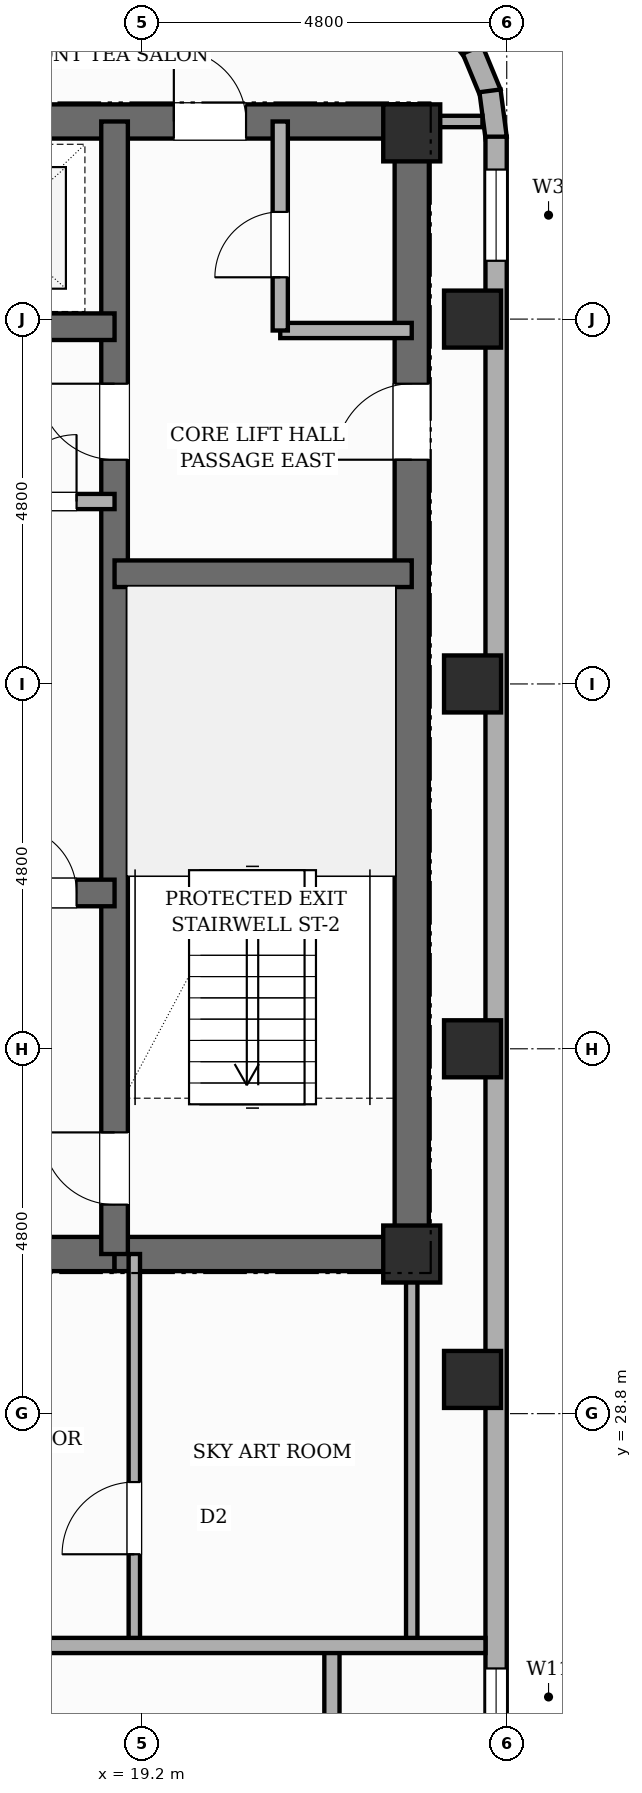
"""IFC4 building model, lengths in metres.
Left out: names, types, materials, properties, quantities, classifications, styles, units other than length and angle.
Written with IfcOpenShell. Run it as: python <this file> out.ifc"""

import sys

from ifc_helpers import new_model, si_unit, direction, frame, frame_2d, origin, origin_2d, place, context, subcontext, project, spatial, rectangle, extrude, element, fill, save


model = new_model("IFC4")
c1 = context("Model", 3, precision=1e-05, world=origin(), true_north=direction((0.0, 1.0)))
c2 = subcontext(c1, "Body", "Model", "MODEL_VIEW")
j1 = project(units=[si_unit("LENGTHUNIT", "METRE"), si_unit("PLANEANGLEUNIT", "RADIAN")], contexts=[c1])
p1 = place(None, origin())
s1 = spatial("IfcSite", under=j1, at=p1, CompositionType="ELEMENT")
p2 = place(p1, origin())
s2 = spatial("IfcBuilding", under=s1, at=p2, CompositionType="ELEMENT")
p3 = place(p2, frame((0.0, 0.0, 278.5)))
s3 = spatial("IfcBuildingStorey", under=s2, at=p3, CompositionType="ELEMENT", Elevation=278.5)
p4 = place(p3, frame((22.75, 30.675, 0.0), z_axis=(0.0, 0.0, 1.0), x_axis=(0.0, 1.0, 0.0)))
e1 = element("IfcWall", 1, at=p4, inside=s3, PredefinedType="SHEAR", context=c2, shape_type="SweptSolid", body=[
    extrude(rectangle(XDim=15.35, YDim=0.45, at=frame_2d((7.675, 0.0))), origin(), (0.0, 0.0, 1.0), 4.3),
])
p5 = place(p4, frame((10.675, 0.0, 0.0)))
e2 = element("IfcOpeningElement", 2, at=p5, cuts=e1, PredefinedType="OPENING", context=c2, shape_type="SweptSolid", body=[
    extrude(rectangle(XDim=1.0, YDim=2.15, at=frame_2d((0.5, 1.075))), frame((0.0, 0.235, 0.0), z_axis=(0.0, -1.0, 0.0), x_axis=(1.0, 0.0, 0.0)), (0.0, 0.0, 1.0), 0.47),
])
p6 = place(p3, frame((6.05, 45.8, 0.0), z_axis=(0.0, 0.0, 1.0), x_axis=(1.0, 0.0, 0.0)))
e3 = element("IfcWall", 3, at=p6, inside=s3, PredefinedType="SHEAR", context=c2, shape_type="SweptSolid", body=[
    extrude(rectangle(XDim=16.7, YDim=0.45, at=frame_2d((8.35, 0.0))), origin(), (0.0, 0.0, 1.0), 4.3),
])
p7 = place(p6, frame((13.57, 0.0, 0.0)))
e4 = element("IfcOpeningElement", 4, at=p7, cuts=e3, PredefinedType="OPENING", context=c2, shape_type="SweptSolid", body=[
    extrude(rectangle(XDim=0.95, YDim=2.15, at=frame_2d((0.475, 1.075))), frame((0.0, 0.235, 0.0), z_axis=(0.0, -1.0, 0.0), x_axis=(1.0, 0.0, 0.0)), (0.0, 0.0, 1.0), 0.47),
])
p8 = place(p3, frame((9.96, 30.9, 0.0), z_axis=(0.0, 0.0, 1.0), x_axis=(1.0, 0.0, 0.0)))
e5 = element("IfcWall", 5, at=p8, inside=s3, PredefinedType="SHEAR", context=c2, shape_type="SweptSolid", body=[
    extrude(rectangle(XDim=8.88, YDim=0.45, at=frame_2d((4.44, 0.0))), origin(), (0.0, 0.0, 1.0), 4.3),
])
p9 = place(p8, frame((4.09, 0.0, 0.0)))
e6 = element("IfcOpeningElement", 6, at=p9, cuts=e5, PredefinedType="OPENING", context=c2, shape_type="SweptSolid", body=[
    extrude(rectangle(XDim=1.0, YDim=2.15, at=frame_2d((0.5, 1.075))), frame((0.0, 0.235, 0.0), z_axis=(0.0, -1.0, 0.0), x_axis=(1.0, 0.0, 0.0)), (0.0, 0.0, 1.0), 0.47),
])
p10 = place(p3, frame((18.84, 30.9, 0.0), z_axis=(0.0, 0.0, 1.0), x_axis=(1.0, 0.0, 0.0)))
e7 = element("IfcWall", 7, at=p10, inside=s3, PredefinedType="SHEAR", context=c2, shape_type="SweptSolid", body=[
    extrude(rectangle(XDim=3.91, YDim=0.45, at=frame_2d((1.955, 0.0))), origin(), (0.0, 0.0, 1.0), 4.3),
])
p11 = place(p3, frame((18.84, 30.9, 0.0), z_axis=(0.0, 0.0, 1.0), x_axis=(0.0, 1.0, 0.0)))
e8 = element("IfcWall", 8, at=p11, inside=s3, PredefinedType="SHEAR", context=c2, shape_type="SweptSolid", body=[
    extrude(rectangle(XDim=14.9, YDim=0.35, at=frame_2d((7.45, 0.0))), origin(), (0.0, 0.0, 1.0), 4.3),
])
p12 = place(p11, frame((0.65, 0.0, 0.0)))
e9 = element("IfcOpeningElement", 9, at=p12, cuts=e8, PredefinedType="OPENING", context=c2, shape_type="SweptSolid", body=[
    extrude(rectangle(XDim=0.95, YDim=2.1, at=frame_2d((0.475, 1.05))), frame((0.0, 0.185, 0.0), z_axis=(0.0, -1.0, 0.0), x_axis=(1.0, 0.0, 0.0)), (0.0, 0.0, 1.0), 0.37),
])
p13 = place(p11, frame((10.45, 0.0, 0.0)))
e10 = element("IfcOpeningElement", 10, at=p13, cuts=e8, PredefinedType="OPENING", context=c2, shape_type="SweptSolid", body=[
    extrude(rectangle(XDim=1.0, YDim=2.15, at=frame_2d((0.5, 1.075))), frame((0.0, 0.185, 0.0), z_axis=(0.0, -1.0, 0.0), x_axis=(1.0, 0.0, 0.0)), (0.0, 0.0, 1.0), 0.37),
])
p14 = place(p3, frame((18.84, 39.85, 0.0), z_axis=(0.0, 0.0, 1.0), x_axis=(1.0, 0.0, 0.0)))
e11 = element("IfcWall", 11, at=p14, inside=s3, PredefinedType="SHEAR", context=c2, shape_type="SweptSolid", body=[
    extrude(rectangle(XDim=3.91, YDim=0.35, at=frame_2d((1.955, 0.0))), origin(), (0.0, 0.0, 1.0), 4.3),
])
p15 = place(p3, frame((9.96, 35.65, 0.0), z_axis=(0.0, 0.0, 1.0), x_axis=(1.0, 0.0, 0.0)))
e12 = element("IfcWall", 12, at=p15, inside=s3, PredefinedType="SHEAR", context=c2, shape_type="SweptSolid", body=[
    extrude(rectangle(XDim=8.88, YDim=0.35, at=frame_2d((4.44, 0.0))), origin(), (0.0, 0.0, 1.0), 4.3),
])
p16 = place(p15, frame((0.84, 0.0, 0.0)))
e13 = element("IfcOpeningElement", 13, at=p16, cuts=e12, PredefinedType="OPENING", context=c2, shape_type="SweptSolid", body=[
    extrude(rectangle(XDim=1.1, YDim=2.15, at=frame_2d((0.55, 1.075))), frame((0.0, 0.185, 0.0), z_axis=(0.0, -1.0, 0.0), x_axis=(1.0, 0.0, 0.0)), (0.0, 0.0, 1.0), 0.37),
])
p17 = place(p15, frame((5.24, 0.0, 0.0)))
e14 = element("IfcOpeningElement", 14, at=p17, cuts=e12, PredefinedType="OPENING", context=c2, shape_type="SweptSolid", body=[
    extrude(rectangle(XDim=1.1, YDim=2.15, at=frame_2d((0.55, 1.075))), frame((0.0, 0.185, 0.0), z_axis=(0.0, -1.0, 0.0), x_axis=(1.0, 0.0, 0.0)), (0.0, 0.0, 1.0), 0.37),
])
p18 = place(p15, frame((7.5, 0.0, 0.0)))
e15 = element("IfcOpeningElement", 15, at=p18, cuts=e12, PredefinedType="OPENING", context=c2, shape_type="SweptSolid", body=[
    extrude(rectangle(XDim=0.88, YDim=2.1, at=frame_2d((0.44, 1.05))), frame((0.0, 0.185, 0.0), z_axis=(0.0, -1.0, 0.0), x_axis=(1.0, 0.0, 0.0)), (0.0, 0.0, 1.0), 0.37),
])
p19 = place(p3, frame((9.96, 43.1, 0.0), z_axis=(0.0, 0.0, 1.0), x_axis=(1.0, 0.0, 0.0)))
e16 = element("IfcWall", 16, at=p19, inside=s3, PredefinedType="SHEAR", context=c2, shape_type="SweptSolid", body=[
    extrude(rectangle(XDim=8.88, YDim=0.35, at=frame_2d((4.44, 0.0))), origin(), (0.0, 0.0, 1.0), 4.3),
])
p20 = place(p19, frame((0.99, 0.0, 0.0)))
e17 = element("IfcOpeningElement", 17, at=p20, cuts=e16, PredefinedType="OPENING", context=c2, shape_type="SweptSolid", body=[
    extrude(rectangle(XDim=1.1, YDim=2.15, at=frame_2d((0.55, 1.075))), frame((0.0, 0.185, 0.0), z_axis=(0.0, -1.0, 0.0), x_axis=(1.0, 0.0, 0.0)), (0.0, 0.0, 1.0), 0.37),
])
p21 = place(p19, frame((3.89, 0.0, 0.0)))
e18 = element("IfcOpeningElement", 18, at=p21, cuts=e16, PredefinedType="OPENING", context=c2, shape_type="SweptSolid", body=[
    extrude(rectangle(XDim=1.1, YDim=2.15, at=frame_2d((0.55, 1.075))), frame((0.0, 0.185, 0.0), z_axis=(0.0, -1.0, 0.0), x_axis=(1.0, 0.0, 0.0)), (0.0, 0.0, 1.0), 0.37),
])
p22 = place(p19, frame((6.79, 0.0, 0.0)))
e19 = element("IfcOpeningElement", 19, at=p22, cuts=e16, PredefinedType="OPENING", context=c2, shape_type="SweptSolid", body=[
    extrude(rectangle(XDim=1.1, YDim=2.15, at=frame_2d((0.55, 1.075))), frame((0.0, 0.185, 0.0), z_axis=(0.0, -1.0, 0.0), x_axis=(1.0, 0.0, 0.0)), (0.0, 0.0, 1.0), 0.37),
])
for number, where, z_axis, x_axis in (
    (20, (22.75, 30.9, 0.0), (0.0, 0.0, 1.0), (1.0, 0.0, 0.0)),
    (21, (22.75, 45.65, 0.0), (0.0, 0.0, 1.0), (1.0, 0.0, 0.0)),
    (22, (23.55, 29.25, 0.0), (0.0, 0.0, 1.0), (1.0, 0.0, 0.0)),
    (23, (23.55, 33.6, 0.0), (0.0, 0.0, 1.0), (1.0, 0.0, 0.0)),
    (24, (23.55, 38.4, 0.0), (0.0, 0.0, 1.0), (1.0, 0.0, 0.0)),
    (25, (23.55, 43.2, 0.0), (0.0, 0.0, 1.0), (1.0, 0.0, 0.0)),
):
    element("IfcColumn", number, at=place(p3, frame(where, z_axis=z_axis, x_axis=x_axis)), inside=s3, PredefinedType="COLUMN", context=c2, shape_type="SweptSolid", body=[
        extrude(rectangle(XDim=0.75, YDim=0.75, at=origin_2d()), origin(), (0.0, 0.0, 1.0), 4.3),
    ])
for number, where, z_axis, x_axis in (
    (26, (23.186, 47.212, 0.0), (0.0, 0.0, 1.0), (0.609, -0.793, 0.0)),
    (27, (23.549, 46.746, 0.0), (0.0, 0.0, 1.0), (0.382, -0.924, 0.0)),
    (28, (23.779, 46.203, 0.0), (0.0, 0.0, 1.0), (0.131, -0.991, 0.0)),
):
    element("IfcWall", number, at=place(p3, frame(where, z_axis=z_axis, x_axis=x_axis)), inside=s3, PredefinedType="STANDARD", context=c2, shape_type="SweptSolid", body=[
        extrude(rectangle(XDim=0.626, YDim=0.28, at=frame_2d((0.313, 0.0))), origin(), (0.0, 0.0, 1.0), 3.32),
    ])
p23 = place(p3, frame((23.86, 45.6, 0.0), z_axis=(0.0, 0.0, 1.0), x_axis=(0.0, -1.0, 0.0)))
e29 = element("IfcWall", 29, at=p23, inside=s3, PredefinedType="STANDARD", context=c2, shape_type="SweptSolid", body=[
    extrude(rectangle(XDim=32.4, YDim=0.28, at=frame_2d((16.2, 0.0))), origin(), (0.0, 0.0, 1.0), 3.32),
])
p24 = place(p23, frame((28.25, 0.0, 0.0)))
e30 = element("IfcOpeningElement", 30, at=p24, cuts=e29, PredefinedType="OPENING", context=c2, shape_type="SweptSolid", body=[
    extrude(rectangle(XDim=1.1, YDim=2.15, at=frame_2d((0.55, 1.075))), frame((0.0, 0.15, 0.0), z_axis=(0.0, -1.0, 0.0), x_axis=(1.0, 0.0, 0.0)), (0.0, 0.0, 1.0), 0.3),
])
p25 = place(p23, frame((29.752, 0.0, 0.45)))
e31 = element("IfcOpeningElement", 31, at=p25, cuts=e29, PredefinedType="OPENING", context=c2, shape_type="SweptSolid", body=[
    extrude(rectangle(XDim=0.75, YDim=1.8, at=frame_2d((0.375, 0.9))), frame((0.0, 0.15, 0.0), z_axis=(0.0, -1.0, 0.0), x_axis=(1.0, 0.0, 0.0)), (0.0, 0.0, 1.0), 0.3),
])
p26 = place(p23, frame((20.153, 0.0, 0.45)))
e32 = element("IfcOpeningElement", 32, at=p26, cuts=e29, PredefinedType="OPENING", context=c2, shape_type="SweptSolid", body=[
    extrude(rectangle(XDim=0.75, YDim=1.8, at=frame_2d((0.375, 0.9))), frame((0.0, 0.15, 0.0), z_axis=(0.0, -1.0, 0.0), x_axis=(1.0, 0.0, 0.0)), (0.0, 0.0, 1.0), 0.3),
])
p27 = place(p23, frame((0.433, 0.0, 0.8)))
e33 = element("IfcOpeningElement", 33, at=p27, cuts=e29, PredefinedType="OPENING", context=c2, shape_type="SweptSolid", body=[
    extrude(rectangle(XDim=1.2, YDim=1.8, at=frame_2d((0.6, 0.9))), frame((0.0, 0.15, 0.0), z_axis=(0.0, -1.0, 0.0), x_axis=(1.0, 0.0, 0.0)), (0.0, 0.0, 1.0), 0.3),
])
p28 = place(p3, frame((9.96, 40.8, 0.0), z_axis=(0.0, 0.0, 1.0), x_axis=(1.0, 0.0, 0.0)))
e34 = element("IfcWall", 34, at=p28, inside=s3, PredefinedType="POLYGONAL", context=c2, shape_type="SweptSolid", body=[
    extrude(rectangle(XDim=8.88, YDim=0.2, at=frame_2d((4.44, 0.0))), origin(), (0.0, 0.0, 1.0), 4.04),
])
p29 = place(p28, frame((7.5, 0.0, 0.0)))
e35 = element("IfcOpeningElement", 35, at=p29, cuts=e34, PredefinedType="OPENING", context=c2, shape_type="SweptSolid", body=[
    extrude(rectangle(XDim=0.88, YDim=2.1, at=frame_2d((0.44, 1.05))), frame((0.0, 0.11, 0.0), z_axis=(0.0, -1.0, 0.0), x_axis=(1.0, 0.0, 0.0)), (0.0, 0.0, 1.0), 0.22),
])
p30 = place(p28, frame((2.2, 0.0, 0.0)))
e36 = element("IfcOpeningElement", 36, at=p30, cuts=e34, PredefinedType="OPENING", context=c2, shape_type="SweptSolid", body=[
    extrude(rectangle(XDim=0.88, YDim=2.1, at=frame_2d((0.44, 1.05))), frame((0.0, 0.11, 0.0), z_axis=(0.0, -1.0, 0.0), x_axis=(1.0, 0.0, 0.0)), (0.0, 0.0, 1.0), 0.22),
])
p31 = place(p28, frame((5.5, 0.0, 0.0)))
e37 = element("IfcOpeningElement", 37, at=p31, cuts=e34, PredefinedType="OPENING", context=c2, shape_type="SweptSolid", body=[
    extrude(rectangle(XDim=0.88, YDim=2.1, at=frame_2d((0.44, 1.05))), frame((0.0, 0.11, 0.0), z_axis=(0.0, -1.0, 0.0), x_axis=(1.0, 0.0, 0.0)), (0.0, 0.0, 1.0), 0.22),
])
p32 = place(p3, frame((21.02, 43.05, 0.0), z_axis=(0.0, 0.0, 1.0), x_axis=(1.0, 0.0, 0.0)))
e38 = element("IfcWall", 38, at=p32, inside=s3, PredefinedType="POLYGONAL", context=c2, shape_type="SweptSolid", body=[
    extrude(rectangle(XDim=1.73, YDim=0.2, at=frame_2d((0.865, 0.0))), origin(), (0.0, 0.0, 1.0), 3.32),
])
p33 = place(p3, frame((21.02, 43.05, 0.0), z_axis=(0.0, 0.0, 1.0), x_axis=(0.0, 1.0, 0.0)))
e39 = element("IfcWall", 39, at=p33, inside=s3, PredefinedType="POLYGONAL", context=c2, shape_type="SweptSolid", body=[
    extrude(rectangle(XDim=2.75, YDim=0.2, at=frame_2d((1.375, 0.0))), origin(), (0.0, 0.0, 1.0), 4.04),
])
p34 = place(p33, frame((0.7, 0.0, 0.0)))
e40 = element("IfcOpeningElement", 40, at=p34, cuts=e39, PredefinedType="OPENING", context=c2, shape_type="SweptSolid", body=[
    extrude(rectangle(XDim=0.86, YDim=2.1, at=frame_2d((0.43, 1.05))), frame((0.0, 0.11, 0.0), z_axis=(0.0, -1.0, 0.0), x_axis=(1.0, 0.0, 0.0)), (0.0, 0.0, 1.0), 0.22),
])
p35 = place(p3, frame((22.75, 25.75, 0.0), z_axis=(0.0, 0.0, 1.0), x_axis=(0.0, 1.0, 0.0)))
e41 = element("IfcWall", 41, at=p35, inside=s3, PredefinedType="PARTITIONING", context=c2, shape_type="SweptSolid", body=[
    extrude(rectangle(XDim=5.15, YDim=0.15, at=frame_2d((2.575, 0.0))), origin(), (0.0, 0.0, 1.0), 4.04),
])
p36 = place(p3, frame((19.1, 25.75, 0.0), z_axis=(0.0, 0.0, 1.0), x_axis=(0.0, 1.0, 0.0)))
e42 = element("IfcWall", 42, at=p36, inside=s3, PredefinedType="PARTITIONING", context=c2, shape_type="SweptSolid", body=[
    extrude(rectangle(XDim=5.15, YDim=0.15, at=frame_2d((2.575, 0.0))), origin(), (0.0, 0.0, 1.0), 4.04),
])
p37 = place(p36, frame((1.2, 0.0, 0.0)))
e43 = element("IfcOpeningElement", 43, at=p37, cuts=e42, PredefinedType="OPENING", context=c2, shape_type="SweptSolid", body=[
    extrude(rectangle(XDim=0.95, YDim=2.15, at=frame_2d((0.475, 1.075))), frame((0.0, 0.085, 0.0), z_axis=(0.0, -1.0, 0.0), x_axis=(1.0, 0.0, 0.0)), (0.0, 0.0, 1.0), 0.17),
])
p38 = place(p3, frame((21.7, 11.12, 0.0), z_axis=(0.0, 0.0, 1.0), x_axis=(0.0, 1.0, 0.0)))
e44 = element("IfcWall", 44, at=p38, inside=s3, PredefinedType="PARTITIONING", context=c2, shape_type="SweptSolid", body=[
    extrude(rectangle(XDim=14.63, YDim=0.2, at=frame_2d((7.315, 0.0))), origin(), (0.0, 0.0, 1.0), 4.04),
])
p39 = place(p38, frame((3.13, 0.0, 0.0)))
e45 = element("IfcOpeningElement", 45, at=p39, cuts=e44, PredefinedType="OPENING", context=c2, shape_type="SweptSolid", body=[
    extrude(rectangle(XDim=0.95, YDim=2.15, at=frame_2d((0.475, 1.075))), frame((0.0, 0.11, 0.0), z_axis=(0.0, -1.0, 0.0), x_axis=(1.0, 0.0, 0.0)), (0.0, 0.0, 1.0), 0.22),
])
p40 = place(p38, frame((10.45, 0.0, 0.0)))
e46 = element("IfcOpeningElement", 46, at=p40, cuts=e44, PredefinedType="OPENING", context=c2, shape_type="SweptSolid", body=[
    extrude(rectangle(XDim=0.95, YDim=2.15, at=frame_2d((0.475, 1.075))), frame((0.0, 0.11, 0.0), z_axis=(0.0, -1.0, 0.0), x_axis=(1.0, 0.0, 0.0)), (0.0, 0.0, 1.0), 0.22),
])
p41 = place(p3, frame((15.5, 25.75, 0.0), z_axis=(0.0, 0.0, 1.0), x_axis=(1.0, 0.0, 0.0)))
e47 = element("IfcWall", 47, at=p41, inside=s3, PredefinedType="PARTITIONING", context=c2, shape_type="SweptSolid", body=[
    extrude(rectangle(XDim=8.22, YDim=0.2, at=frame_2d((4.11, 0.0))), origin(), (0.0, 0.0, 1.0), 4.04),
])
p42 = place(p3, frame((22.75, 45.8, 0.0), z_axis=(0.0, 0.0, 1.0), x_axis=(1.0, 0.0, 0.0)))
e48 = element("IfcWall", 48, at=p42, inside=s3, PredefinedType="PARTITIONING", context=c2, shape_type="SweptSolid", body=[
    extrude(rectangle(XDim=0.93, YDim=0.15, at=frame_2d((0.465, 0.0))), origin(), (0.0, 0.0, 1.0), 4.04),
])
p43 = place(p26, origin())
e49 = element("IfcWindow", 49, at=p43, inside=s3, PartitioningType="SINGLE_PANEL", PredefinedType="WINDOW", context=c2, shape_type="SweptSolid", body=[
    extrude(rectangle(XDim=0.75, YDim=1.8, at=frame_2d((0.375, 0.9))), frame((0.0, 0.03, 0.0), z_axis=(0.0, -1.0, 0.0), x_axis=(1.0, 0.0, 0.0)), (0.0, 0.0, 1.0), 0.06),
])
fill(e32, e49)
p44 = place(p27, origin())
e50 = element("IfcWindow", 50, at=p44, inside=s3, PartitioningType="SINGLE_PANEL", PredefinedType="WINDOW", context=c2, shape_type="SweptSolid", body=[
    extrude(rectangle(XDim=1.2, YDim=1.8, at=frame_2d((0.6, 0.9))), frame((0.0, 0.03, 0.0), z_axis=(0.0, -1.0, 0.0), x_axis=(1.0, 0.0, 0.0)), (0.0, 0.0, 1.0), 0.06),
])
fill(e33, e50)
p45 = place(p12, origin())
e51 = element("IfcDoor", 51, at=p45, inside=s3, OperationType="SINGLE_SWING_RIGHT", PredefinedType="DOOR", context=c2, shape_type="SweptSolid", body=[
    extrude(rectangle(XDim=0.95, YDim=2.1, at=frame_2d((0.475, 1.05))), frame((0.0, 0.025, 0.0), z_axis=(0.0, -1.0, 0.0), x_axis=(1.0, 0.0, 0.0)), (0.0, 0.0, 1.0), 0.05),
])
fill(e9, e51)
p46 = place(p18, origin())
e52 = element("IfcDoor", 52, at=p46, inside=s3, OperationType="SINGLE_SWING_LEFT", PredefinedType="DOOR", context=c2, shape_type="SweptSolid", body=[
    extrude(rectangle(XDim=0.88, YDim=2.1, at=frame_2d((0.44, 1.05))), frame((0.0, 0.025, 0.0), z_axis=(0.0, -1.0, 0.0), x_axis=(1.0, 0.0, 0.0)), (0.0, 0.0, 1.0), 0.05),
])
fill(e15, e52)
p47 = place(p29, origin())
e53 = element("IfcDoor", 53, at=p47, inside=s3, OperationType="SINGLE_SWING_RIGHT", PredefinedType="DOOR", context=c2, shape_type="SweptSolid", body=[
    extrude(rectangle(XDim=0.88, YDim=2.1, at=frame_2d((0.44, 1.05))), frame((0.0, 0.025, 0.0), z_axis=(0.0, -1.0, 0.0), x_axis=(1.0, 0.0, 0.0)), (0.0, 0.0, 1.0), 0.05),
])
fill(e35, e53)
p48 = place(p13, origin())
e54 = element("IfcDoor", 54, at=p48, inside=s3, OperationType="SINGLE_SWING_RIGHT", PredefinedType="DOOR", context=c2, shape_type="SweptSolid", body=[
    extrude(rectangle(XDim=1.0, YDim=2.15, at=frame_2d((0.5, 1.075))), frame((0.0, 0.025, 0.0), z_axis=(0.0, -1.0, 0.0), x_axis=(1.0, 0.0, 0.0)), (0.0, 0.0, 1.0), 0.05),
])
fill(e10, e54)
p49 = place(p5, origin())
e55 = element("IfcDoor", 55, at=p49, inside=s3, OperationType="SINGLE_SWING_LEFT", PredefinedType="DOOR", context=c2, shape_type="SweptSolid", body=[
    extrude(rectangle(XDim=1.0, YDim=2.15, at=frame_2d((0.5, 1.075))), frame((0.0, 0.025, 0.0), z_axis=(0.0, -1.0, 0.0), x_axis=(1.0, 0.0, 0.0)), (0.0, 0.0, 1.0), 0.05),
])
fill(e2, e55)
p50 = place(p7, origin())
e56 = element("IfcDoor", 56, at=p50, inside=s3, OperationType="SINGLE_SWING_LEFT", PredefinedType="DOOR", context=c2, shape_type="SweptSolid", body=[
    extrude(rectangle(XDim=0.95, YDim=2.15, at=frame_2d((0.475, 1.075))), frame((0.0, 0.025, 0.0), z_axis=(0.0, -1.0, 0.0), x_axis=(1.0, 0.0, 0.0)), (0.0, 0.0, 1.0), 0.05),
])
fill(e4, e56)
p51 = place(p34, origin())
e57 = element("IfcDoor", 57, at=p51, inside=s3, OperationType="SINGLE_SWING_LEFT", PredefinedType="DOOR", context=c2, shape_type="SweptSolid", body=[
    extrude(rectangle(XDim=0.86, YDim=2.1, at=frame_2d((0.43, 1.05))), frame((0.0, 0.025, 0.0), z_axis=(0.0, -1.0, 0.0), x_axis=(1.0, 0.0, 0.0)), (0.0, 0.0, 1.0), 0.05),
])
fill(e40, e57)
p52 = place(p37, origin())
e58 = element("IfcDoor", 58, at=p52, inside=s3, OperationType="SINGLE_SWING_LEFT", PredefinedType="DOOR", context=c2, shape_type="SweptSolid", body=[
    extrude(rectangle(XDim=0.95, YDim=2.15, at=frame_2d((0.475, 1.075))), frame((0.0, 0.025, 0.0), z_axis=(0.0, -1.0, 0.0), x_axis=(1.0, 0.0, 0.0)), (0.0, 0.0, 1.0), 0.05),
])
fill(e43, e58)
save(model, sys.argv[1])
